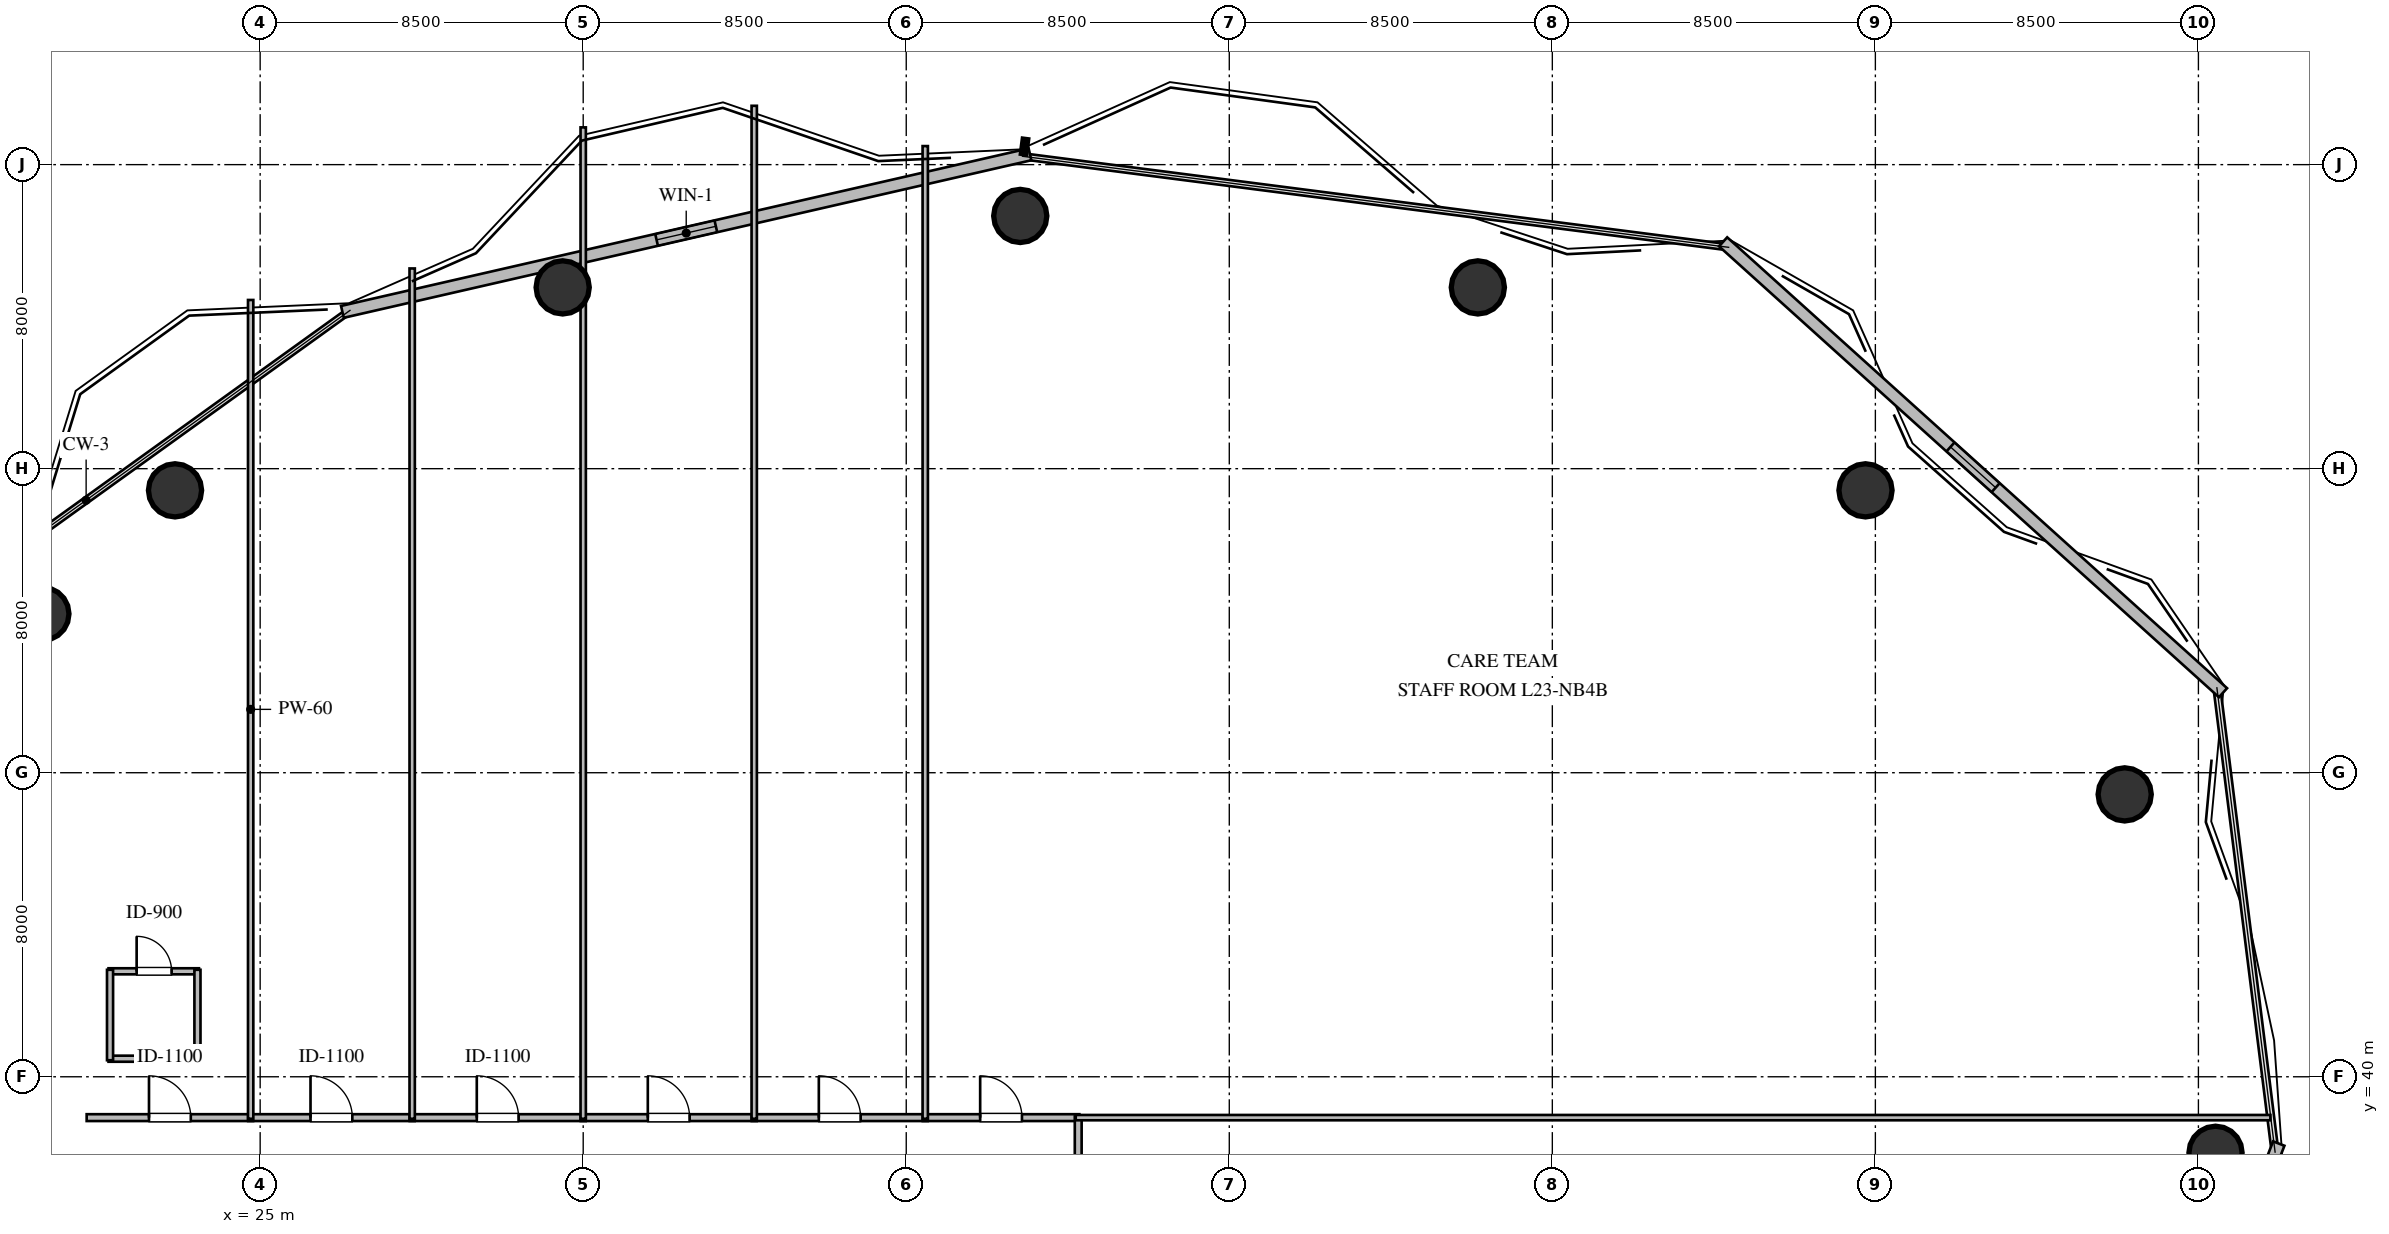
"""IFC4 building model, lengths in metres.
Left out: names, types, materials, properties, quantities, classifications, styles, units other than length and angle.
Written with IfcOpenShell. Run it as: python <this file> out.ifc"""

import sys

from ifc_helpers import new_model, si_unit, direction, frame, frame_2d, origin, origin_2d, place, context, subcontext, project, spatial, rectangle, circle, extrude, element, fill, save


model = new_model("IFC4")
c1 = context("Model", 3, precision=1e-05, world=origin(), true_north=direction((0.0, 1.0)))
c2 = subcontext(c1, "Body", "Model", "MODEL_VIEW")
j1 = project(units=[si_unit("LENGTHUNIT", "METRE"), si_unit("PLANEANGLEUNIT", "RADIAN")], contexts=[c1])
p1 = place(None, origin())
s1 = spatial("IfcSite", under=j1, at=p1, CompositionType="ELEMENT")
p2 = place(p1, origin())
s2 = spatial("IfcBuilding", under=s1, at=p2, CompositionType="ELEMENT")
p3 = place(p2, frame((0.0, 0.0, 88.8)))
s3 = spatial("IfcBuildingStorey", under=s2, at=p3, CompositionType="ELEMENT", Elevation=88.8)
for number, where, z_axis, x_axis in (
    (1, (76.45, 38.0, 0.0), (0.0, 0.0, 1.0), (1.0, 0.0, 0.0)),
    (2, (74.06, 47.43, 0.0), (0.0, 0.0, 1.0), (1.0, 0.0, 0.0)),
    (3, (67.24, 55.43, 0.0), (0.0, 0.0, 1.0), (1.0, 0.0, 0.0)),
    (4, (57.04, 60.77, 0.0), (0.0, 0.0, 1.0), (1.0, 0.0, 0.0)),
    (5, (45.0, 62.65, 0.0), (0.0, 0.0, 1.0), (1.0, 0.0, 0.0)),
    (6, (32.96, 60.77, 0.0), (0.0, 0.0, 1.0), (1.0, 0.0, 0.0)),
    (7, (22.76, 55.43, 0.0), (0.0, 0.0, 1.0), (1.0, 0.0, 0.0)),
    (8, (19.27, 52.18, 0.0), (0.0, 0.0, 1.0), (1.0, 0.0, 0.0)),
):
    element("IfcColumn", number, at=place(p3, frame(where, z_axis=z_axis, x_axis=x_axis)), inside=s3, PredefinedType="COLUMN", context=c2, shape_type="SweptSolid", body=[
        extrude(circle(Radius=0.7, at=origin_2d()), origin(), (0.0, 0.0, 1.0), 3.6),
    ])
p4 = place(p3, frame((78.114, 38.243, 0.0), z_axis=(0.0, 0.0, 1.0), x_axis=(-0.360517110943, -0.932752599952, 0.0)))
e9 = element("IfcWall", 9, at=p4, inside=s3, PredefinedType="STANDARD", context=c2, shape_type="SweptSolid", body=[
    extrude(rectangle(XDim=14.504, YDim=0.32, at=frame_2d((7.252, 0.0))), origin(), (0.0, 0.0, 1.0), 2.577),
])
p5 = place(p3, frame((27.164, 60.126, 0.0), z_axis=(0.0, 0.0, 1.0), x_axis=(0.974744906433, 0.22332122018, 0.0)))
e10 = element("IfcWall", 10, at=p5, inside=s3, PredefinedType="STANDARD", context=c2, shape_type="SweptSolid", body=[
    extrude(rectangle(XDim=18.561, YDim=0.32, at=frame_2d((9.28, 0.0))), origin(), (0.0, 0.0, 1.0), 3.28),
])
p6 = place(p5, frame((8.481, 0.0, 1.05)))
e11 = element("IfcOpeningElement", 11, at=p6, cuts=e10, PredefinedType="OPENING", context=c2, shape_type="SweptSolid", body=[
    extrude(rectangle(XDim=1.6, YDim=1.5, at=frame_2d((0.8, 0.75))), frame((0.0, 0.17, 0.0), z_axis=(0.0, -1.0, 0.0), x_axis=(1.0, 0.0, 0.0)), (0.0, 0.0, 1.0), 0.34),
])
p7 = place(p3, frame((63.494, 61.969, 0.0), z_axis=(0.0, 0.0, 1.0), x_axis=(0.7425569544, -0.669782927128, 0.0)))
e12 = element("IfcWall", 12, at=p7, inside=s3, PredefinedType="STANDARD", context=c2, shape_type="SweptSolid", body=[
    extrude(rectangle(XDim=17.713, YDim=0.32, at=frame_2d((8.856, 0.0))), origin(), (0.0, 0.0, 1.0), 3.28),
])
p8 = place(p7, frame((8.057, 0.0, 1.05)))
e13 = element("IfcOpeningElement", 13, at=p8, cuts=e12, PredefinedType="OPENING", context=c2, shape_type="SweptSolid", body=[
    extrude(rectangle(XDim=1.6, YDim=1.5, at=frame_2d((0.8, 0.75))), frame((0.0, 0.17, 0.0), z_axis=(0.0, -1.0, 0.0), x_axis=(1.0, 0.0, 0.0)), (0.0, 0.0, 1.0), 0.34),
])
p9 = place(p3, frame((21.01, 40.475, 0.0), z_axis=(0.0, 0.0, 1.0), x_axis=(1.0, 0.0, 0.0)))
e14 = element("IfcWall", 14, at=p9, inside=s3, PredefinedType="PLUMBINGWALL", context=c2, shape_type="SweptSolid", body=[
    extrude(rectangle(XDim=2.38, YDim=0.16, at=frame_2d((1.19, 0.0))), origin(), (0.0, 0.0, 1.0), 3.28),
])
p10 = place(p3, frame((21.01, 42.775, 0.0), z_axis=(0.0, 0.0, 1.0), x_axis=(1.0, 0.0, 0.0)))
e15 = element("IfcWall", 15, at=p10, inside=s3, PredefinedType="PLUMBINGWALL", context=c2, shape_type="SweptSolid", body=[
    extrude(rectangle(XDim=2.38, YDim=0.16, at=frame_2d((1.19, 0.0))), origin(), (0.0, 0.0, 1.0), 3.28),
])
p11 = place(p10, frame((0.74, 0.0, 0.0)))
e16 = element("IfcOpeningElement", 16, at=p11, cuts=e15, PredefinedType="OPENING", context=c2, shape_type="SweptSolid", body=[
    extrude(rectangle(XDim=0.92, YDim=2.1, at=frame_2d((0.46, 1.05))), frame((0.0, 0.09, 0.0), z_axis=(0.0, -1.0, 0.0), x_axis=(1.0, 0.0, 0.0)), (0.0, 0.0, 1.0), 0.18),
])
p12 = place(p3, frame((21.05, 40.435, 0.0), z_axis=(0.0, 0.0, 1.0), x_axis=(0.0, 1.0, 0.0)))
e17 = element("IfcWall", 17, at=p12, inside=s3, PredefinedType="PLUMBINGWALL", context=c2, shape_type="SweptSolid", body=[
    extrude(rectangle(XDim=2.38, YDim=0.16, at=frame_2d((1.19, 0.0))), origin(), (0.0, 0.0, 1.0), 2.81),
])
p13 = place(p3, frame((23.35, 40.435, 0.0), z_axis=(0.0, 0.0, 1.0), x_axis=(0.0, 1.0, 0.0)))
e18 = element("IfcWall", 18, at=p13, inside=s3, PredefinedType="PLUMBINGWALL", context=c2, shape_type="SweptSolid", body=[
    extrude(rectangle(XDim=2.38, YDim=0.16, at=frame_2d((1.19, 0.0))), origin(), (0.0, 0.0, 1.0), 3.28),
])
p14 = place(p3, frame((20.435, 38.925, 0.0), z_axis=(0.0, 0.0, 1.0), x_axis=(1.0, 0.0, 0.0)))
e19 = element("IfcWall", 19, at=p14, inside=s3, PredefinedType="PARTITIONING", context=c2, shape_type="SweptSolid", body=[
    extrude(rectangle(XDim=4.38, YDim=0.18, at=frame_2d((2.19, 0.0))), origin(), (0.0, 0.0, 1.0), 3.28),
])
p15 = place(p14, frame((1.64, 0.0, 0.0)))
e20 = element("IfcOpeningElement", 20, at=p15, cuts=e19, PredefinedType="OPENING", context=c2, shape_type="SweptSolid", body=[
    extrude(rectangle(XDim=1.1, YDim=2.1, at=frame_2d((0.55, 1.05))), frame((0.0, 0.1, 0.0), z_axis=(0.0, -1.0, 0.0), x_axis=(1.0, 0.0, 0.0)), (0.0, 0.0, 1.0), 0.2),
])
p16 = place(p3, frame((24.685, 38.925, 0.0), z_axis=(0.0, 0.0, 1.0), x_axis=(1.0, 0.0, 0.0)))
e21 = element("IfcWall", 21, at=p16, inside=s3, PredefinedType="PARTITIONING", context=c2, shape_type="SweptSolid", body=[
    extrude(rectangle(XDim=4.38, YDim=0.18, at=frame_2d((2.19, 0.0))), origin(), (0.0, 0.0, 1.0), 3.28),
])
p17 = place(p16, frame((1.64, 0.0, 0.0)))
e22 = element("IfcOpeningElement", 22, at=p17, cuts=e21, PredefinedType="OPENING", context=c2, shape_type="SweptSolid", body=[
    extrude(rectangle(XDim=1.1, YDim=2.1, at=frame_2d((0.55, 1.05))), frame((0.0, 0.1, 0.0), z_axis=(0.0, -1.0, 0.0), x_axis=(1.0, 0.0, 0.0)), (0.0, 0.0, 1.0), 0.2),
])
p18 = place(p3, frame((28.935, 38.925, 0.0), z_axis=(0.0, 0.0, 1.0), x_axis=(1.0, 0.0, 0.0)))
e23 = element("IfcWall", 23, at=p18, inside=s3, PredefinedType="PARTITIONING", context=c2, shape_type="SweptSolid", body=[
    extrude(rectangle(XDim=4.63, YDim=0.18, at=frame_2d((2.315, 0.0))), origin(), (0.0, 0.0, 1.0), 3.28),
])
p19 = place(p18, frame((1.765, 0.0, 0.0)))
e24 = element("IfcOpeningElement", 24, at=p19, cuts=e23, PredefinedType="OPENING", context=c2, shape_type="SweptSolid", body=[
    extrude(rectangle(XDim=1.1, YDim=2.1, at=frame_2d((0.55, 1.05))), frame((0.0, 0.1, 0.0), z_axis=(0.0, -1.0, 0.0), x_axis=(1.0, 0.0, 0.0)), (0.0, 0.0, 1.0), 0.2),
])
p20 = place(p3, frame((33.435, 38.925, 0.0), z_axis=(0.0, 0.0, 1.0), x_axis=(1.0, 0.0, 0.0)))
e25 = element("IfcWall", 25, at=p20, inside=s3, PredefinedType="PARTITIONING", context=c2, shape_type="SweptSolid", body=[
    extrude(rectangle(XDim=4.63, YDim=0.18, at=frame_2d((2.315, 0.0))), origin(), (0.0, 0.0, 1.0), 3.28),
])
p21 = place(p20, frame((1.765, 0.0, 0.0)))
e26 = element("IfcOpeningElement", 26, at=p21, cuts=e25, PredefinedType="OPENING", context=c2, shape_type="SweptSolid", body=[
    extrude(rectangle(XDim=1.1, YDim=2.1, at=frame_2d((0.55, 1.05))), frame((0.0, 0.1, 0.0), z_axis=(0.0, -1.0, 0.0), x_axis=(1.0, 0.0, 0.0)), (0.0, 0.0, 1.0), 0.2),
])
p22 = place(p3, frame((37.935, 38.925, 0.0), z_axis=(0.0, 0.0, 1.0), x_axis=(1.0, 0.0, 0.0)))
e27 = element("IfcWall", 27, at=p22, inside=s3, PredefinedType="PARTITIONING", context=c2, shape_type="SweptSolid", body=[
    extrude(rectangle(XDim=4.63, YDim=0.18, at=frame_2d((2.315, 0.0))), origin(), (0.0, 0.0, 1.0), 3.28),
])
p23 = place(p22, frame((1.765, 0.0, 0.0)))
e28 = element("IfcOpeningElement", 28, at=p23, cuts=e27, PredefinedType="OPENING", context=c2, shape_type="SweptSolid", body=[
    extrude(rectangle(XDim=1.1, YDim=2.1, at=frame_2d((0.55, 1.05))), frame((0.0, 0.1, 0.0), z_axis=(0.0, -1.0, 0.0), x_axis=(1.0, 0.0, 0.0)), (0.0, 0.0, 1.0), 0.2),
])
p24 = place(p3, frame((42.435, 38.925, 0.0), z_axis=(0.0, 0.0, 1.0), x_axis=(1.0, 0.0, 0.0)))
e29 = element("IfcWall", 29, at=p24, inside=s3, PredefinedType="PARTITIONING", context=c2, shape_type="SweptSolid", body=[
    extrude(rectangle(XDim=4.12, YDim=0.18, at=frame_2d((2.06, 0.0))), origin(), (0.0, 0.0, 1.0), 3.28),
])
p25 = place(p24, frame((1.51, 0.0, 0.0)))
e30 = element("IfcOpeningElement", 30, at=p25, cuts=e29, PredefinedType="OPENING", context=c2, shape_type="SweptSolid", body=[
    extrude(rectangle(XDim=1.1, YDim=2.1, at=frame_2d((0.55, 1.05))), frame((0.0, 0.1, 0.0), z_axis=(0.0, -1.0, 0.0), x_axis=(1.0, 0.0, 0.0)), (0.0, 0.0, 1.0), 0.2),
])
p26 = place(p3, frame((46.525, 38.955, 0.0), z_axis=(0.0, 0.0, 1.0), x_axis=(0.0, -1.0, 0.0)))
e31 = element("IfcWall", 31, at=p26, inside=s3, PredefinedType="PARTITIONING", context=c2, shape_type="SweptSolid", body=[
    extrude(rectangle(XDim=6.06, YDim=0.18, at=frame_2d((3.03, 0.0))), origin(), (0.0, 0.0, 1.0), 3.28),
])
p27 = place(p26, frame((2.48, 0.0, 0.0)))
e32 = element("IfcOpeningElement", 32, at=p27, cuts=e31, PredefinedType="OPENING", context=c2, shape_type="SweptSolid", body=[
    extrude(rectangle(XDim=1.1, YDim=2.1, at=frame_2d((0.55, 1.05))), frame((0.0, 0.1, 0.0), z_axis=(0.0, -1.0, 0.0), x_axis=(1.0, 0.0, 0.0)), (0.0, 0.0, 1.0), 0.2),
])
p28 = place(p3, frame((24.75, 60.439, 0.0), z_axis=(0.0, 0.0, 1.0), x_axis=(0.0, -1.0, 0.0)))
e33 = element("IfcWall", 33, at=p28, inside=s3, PredefinedType="PARTITIONING", context=c2, shape_type="SweptSolid", body=[
    extrude(rectangle(XDim=21.544, YDim=0.14, at=frame_2d((10.772, 0.0))), origin(), (0.0, 0.0, 1.0), 3.28),
])
p29 = place(p3, frame((29.0, 61.268, 0.0), z_axis=(0.0, 0.0, 1.0), x_axis=(0.0, -1.0, 0.0)))
e34 = element("IfcWall", 34, at=p29, inside=s3, PredefinedType="PARTITIONING", context=c2, shape_type="SweptSolid", body=[
    extrude(rectangle(XDim=22.373, YDim=0.14, at=frame_2d((11.187, 0.0))), origin(), (0.0, 0.0, 1.0), 3.28),
])
p30 = place(p3, frame((33.5, 64.98, 0.0), z_axis=(0.0, 0.0, 1.0), x_axis=(0.0, -1.0, 0.0)))
e35 = element("IfcWall", 35, at=p30, inside=s3, PredefinedType="PARTITIONING", context=c2, shape_type="SweptSolid", body=[
    extrude(rectangle(XDim=26.085, YDim=0.14, at=frame_2d((13.042, 0.0))), origin(), (0.0, 0.0, 1.0), 2.81),
])
p31 = place(p3, frame((38.0, 65.548, 0.0), z_axis=(0.0, 0.0, 1.0), x_axis=(0.0, -1.0, 0.0)))
e36 = element("IfcWall", 36, at=p31, inside=s3, PredefinedType="PARTITIONING", context=c2, shape_type="SweptSolid", body=[
    extrude(rectangle(XDim=26.653, YDim=0.14, at=frame_2d((13.327, 0.0))), origin(), (0.0, 0.0, 1.0), 3.28),
])
p32 = place(p3, frame((42.5, 64.488, 0.0), z_axis=(0.0, 0.0, 1.0), x_axis=(0.0, -1.0, 0.0)))
e37 = element("IfcWall", 37, at=p32, inside=s3, PredefinedType="PARTITIONING", context=c2, shape_type="SweptSolid", body=[
    extrude(rectangle(XDim=25.593, YDim=0.14, at=frame_2d((12.796, 0.0))), origin(), (0.0, 0.0, 1.0), 3.28),
])
p33 = place(p3, frame((77.894, 38.925, 0.0), z_axis=(0.0, 0.0, 1.0), x_axis=(-1.0, 0.0, 0.0)))
e38 = element("IfcWall", 38, at=p33, inside=s3, PredefinedType="PARTITIONING", context=c2, shape_type="SweptSolid", body=[
    extrude(rectangle(XDim=31.434, YDim=0.14, at=frame_2d((15.717, 0.0))), origin(), (0.0, 0.0, 1.0), 3.28),
])
p34 = place(p6, origin())
e39 = element("IfcWindow", 39, at=p34, inside=s3, PartitioningType="SINGLE_PANEL", PredefinedType="WINDOW", context=c2, shape_type="SweptSolid", body=[
    extrude(rectangle(XDim=1.6, YDim=1.5, at=frame_2d((0.8, 0.75))), frame((0.0, 0.03, 0.0), z_axis=(0.0, -1.0, 0.0), x_axis=(1.0, 0.0, 0.0)), (0.0, 0.0, 1.0), 0.06),
])
fill(e11, e39)
p35 = place(p8, origin())
e40 = element("IfcWindow", 40, at=p35, inside=s3, PartitioningType="SINGLE_PANEL", PredefinedType="WINDOW", context=c2, shape_type="SweptSolid", body=[
    extrude(rectangle(XDim=1.6, YDim=1.5, at=frame_2d((0.8, 0.75))), frame((0.0, 0.03, 0.0), z_axis=(0.0, -1.0, 0.0), x_axis=(1.0, 0.0, 0.0)), (0.0, 0.0, 1.0), 0.06),
])
fill(e13, e40)
p36 = place(p11, origin())
e41 = element("IfcDoor", 41, at=p36, inside=s3, OperationType="SINGLE_SWING_LEFT", PredefinedType="DOOR", context=c2, shape_type="SweptSolid", body=[
    extrude(rectangle(XDim=0.92, YDim=2.1, at=frame_2d((0.46, 1.05))), frame((0.0, 0.025, 0.0), z_axis=(0.0, -1.0, 0.0), x_axis=(1.0, 0.0, 0.0)), (0.0, 0.0, 1.0), 0.05),
])
fill(e16, e41)
p37 = place(p15, origin())
e42 = element("IfcDoor", 42, at=p37, inside=s3, OperationType="SINGLE_SWING_LEFT", PredefinedType="DOOR", context=c2, shape_type="SweptSolid", body=[
    extrude(rectangle(XDim=1.1, YDim=2.1, at=frame_2d((0.55, 1.05))), frame((0.0, 0.025, 0.0), z_axis=(0.0, -1.0, 0.0), x_axis=(1.0, 0.0, 0.0)), (0.0, 0.0, 1.0), 0.05),
])
fill(e20, e42)
p38 = place(p17, origin())
e43 = element("IfcDoor", 43, at=p38, inside=s3, OperationType="SINGLE_SWING_LEFT", PredefinedType="DOOR", context=c2, shape_type="SweptSolid", body=[
    extrude(rectangle(XDim=1.1, YDim=2.1, at=frame_2d((0.55, 1.05))), frame((0.0, 0.025, 0.0), z_axis=(0.0, -1.0, 0.0), x_axis=(1.0, 0.0, 0.0)), (0.0, 0.0, 1.0), 0.05),
])
fill(e22, e43)
p39 = place(p19, origin())
e44 = element("IfcDoor", 44, at=p39, inside=s3, OperationType="SINGLE_SWING_LEFT", PredefinedType="DOOR", context=c2, shape_type="SweptSolid", body=[
    extrude(rectangle(XDim=1.1, YDim=2.1, at=frame_2d((0.55, 1.05))), frame((0.0, 0.025, 0.0), z_axis=(0.0, -1.0, 0.0), x_axis=(1.0, 0.0, 0.0)), (0.0, 0.0, 1.0), 0.05),
])
fill(e24, e44)
p40 = place(p21, origin())
e45 = element("IfcDoor", 45, at=p40, inside=s3, OperationType="SINGLE_SWING_LEFT", PredefinedType="DOOR", context=c2, shape_type="SweptSolid", body=[
    extrude(rectangle(XDim=1.1, YDim=2.1, at=frame_2d((0.55, 1.05))), frame((0.0, 0.025, 0.0), z_axis=(0.0, -1.0, 0.0), x_axis=(1.0, 0.0, 0.0)), (0.0, 0.0, 1.0), 0.05),
])
fill(e26, e45)
p41 = place(p23, origin())
e46 = element("IfcDoor", 46, at=p41, inside=s3, OperationType="SINGLE_SWING_LEFT", PredefinedType="DOOR", context=c2, shape_type="SweptSolid", body=[
    extrude(rectangle(XDim=1.1, YDim=2.1, at=frame_2d((0.55, 1.05))), frame((0.0, 0.025, 0.0), z_axis=(0.0, -1.0, 0.0), x_axis=(1.0, 0.0, 0.0)), (0.0, 0.0, 1.0), 0.05),
])
fill(e28, e46)
p42 = place(p25, origin())
e47 = element("IfcDoor", 47, at=p42, inside=s3, OperationType="SINGLE_SWING_LEFT", PredefinedType="DOOR", context=c2, shape_type="SweptSolid", body=[
    extrude(rectangle(XDim=1.1, YDim=2.1, at=frame_2d((0.55, 1.05))), frame((0.0, 0.025, 0.0), z_axis=(0.0, -1.0, 0.0), x_axis=(1.0, 0.0, 0.0)), (0.0, 0.0, 1.0), 0.05),
])
fill(e30, e47)
save(model, sys.argv[1])
